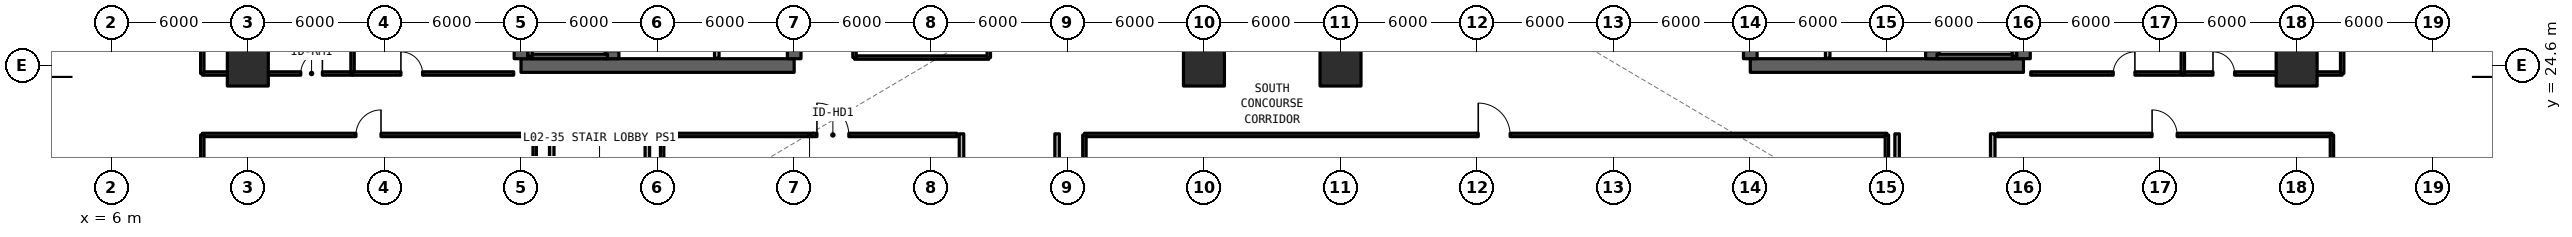
"""IFC4 building model, lengths in metres.
Left out: names, types, materials, properties, quantities, classifications, styles, units other than length and angle.
Written with IfcOpenShell. Run it as: python <this file> out.ifc"""

import sys

from ifc_helpers import new_model, si_unit, direction, frame, frame_2d, origin, origin_2d, place, context, subcontext, project, spatial, rectangle, extrude, element, fill, save


model = new_model("IFC4")
c1 = context("Model", 3, precision=1e-05, world=origin(), true_north=direction((0.0, 1.0)))
c2 = subcontext(c1, "Body", "Model", "MODEL_VIEW")
j1 = project(units=[si_unit("LENGTHUNIT", "METRE"), si_unit("PLANEANGLEUNIT", "RADIAN")], contexts=[c1])
p1 = place(None, origin())
s1 = spatial("IfcSite", under=j1, at=p1, CompositionType="ELEMENT")
p2 = place(p1, origin())
s2 = spatial("IfcBuilding", under=s1, at=p2, CompositionType="ELEMENT")
p3 = place(p2, frame((0.0, 0.0, 4.95)))
s3 = spatial("IfcBuildingStorey", under=s2, at=p3, CompositionType="ELEMENT", Elevation=4.95)
p4 = place(p3, frame((24.0, 24.6, 0.0), z_axis=(0.0, 0.0, 1.0), x_axis=(1.0, 0.0, 0.0)))
e1 = element("IfcWall", 1, at=p4, inside=s3, PredefinedType="SHEAR", context=c2, shape_type="SweptSolid", body=[
    extrude(rectangle(XDim=12.0, YDim=0.6, at=frame_2d((6.0, 0.0))), origin(), (0.0, 0.0, 1.0), 4.95),
])
p5 = place(p3, frame((24.0, 24.9, 0.0), z_axis=(0.0, 0.0, 1.0), x_axis=(0.0, 1.0, 0.0)))
e2 = element("IfcWall", 2, at=p5, inside=s3, PredefinedType="SHEAR", context=c2, shape_type="SweptSolid", body=[
    extrude(rectangle(XDim=17.4, YDim=0.6, at=frame_2d((8.7, 0.0))), origin(), (0.0, 0.0, 1.0), 4.95),
])
p6 = place(p3, frame((36.0, 24.9, 0.0), z_axis=(0.0, 0.0, 1.0), x_axis=(0.0, 1.0, 0.0)))
e3 = element("IfcWall", 3, at=p6, inside=s3, PredefinedType="SHEAR", context=c2, shape_type="SweptSolid", body=[
    extrude(rectangle(XDim=8.9, YDim=0.6, at=frame_2d((4.45, 0.0))), origin(), (0.0, 0.0, 1.0), 4.95),
])
p7 = place(p3, frame((28.0, 24.9, 0.0), z_axis=(0.0, 0.0, 1.0), x_axis=(0.0, 1.0, 0.0)))
e4 = element("IfcWall", 4, at=p7, inside=s3, PredefinedType="SHEAR", context=c2, shape_type="SweptSolid", body=[
    extrude(rectangle(XDim=17.4, YDim=0.6, at=frame_2d((8.7, 0.0))), origin(), (0.0, 0.0, 1.0), 4.95),
])
p8 = place(p7, frame((0.35, 0.0, 0.0)))
e5 = element("IfcOpeningElement", 5, at=p8, cuts=e4, PredefinedType="OPENING", context=c2, shape_type="SweptSolid", body=[
    extrude(rectangle(XDim=1.15, YDim=2.15, at=frame_2d((0.575, 1.075))), frame((0.0, 0.31, 0.0), z_axis=(0.0, -1.0, 0.0), x_axis=(1.0, 0.0, 0.0)), (0.0, 0.0, 1.0), 0.62),
])
p9 = place(p7, frame((9.55, 0.0, 0.0)))
e6 = element("IfcOpeningElement", 6, at=p9, cuts=e4, PredefinedType="OPENING", context=c2, shape_type="SweptSolid", body=[
    extrude(rectangle(XDim=1.15, YDim=2.15, at=frame_2d((0.575, 1.075))), frame((0.0, 0.31, 0.0), z_axis=(0.0, -1.0, 0.0), x_axis=(1.0, 0.0, 0.0)), (0.0, 0.0, 1.0), 0.62),
])
p10 = place(p3, frame((78.0, 24.6, 0.0), z_axis=(0.0, 0.0, 1.0), x_axis=(1.0, 0.0, 0.0)))
e7 = element("IfcWall", 7, at=p10, inside=s3, PredefinedType="SHEAR", context=c2, shape_type="SweptSolid", body=[
    extrude(rectangle(XDim=12.0, YDim=0.6, at=frame_2d((6.0, 0.0))), origin(), (0.0, 0.0, 1.0), 4.95),
])
p11 = place(p3, frame((90.0, 24.9, 0.0), z_axis=(0.0, 0.0, 1.0), x_axis=(0.0, 1.0, 0.0)))
e8 = element("IfcWall", 8, at=p11, inside=s3, PredefinedType="SHEAR", context=c2, shape_type="SweptSolid", body=[
    extrude(rectangle(XDim=17.4, YDim=0.6, at=frame_2d((8.7, 0.0))), origin(), (0.0, 0.0, 1.0), 4.95),
])
p12 = place(p3, frame((78.0, 24.9, 0.0), z_axis=(0.0, 0.0, 1.0), x_axis=(0.0, 1.0, 0.0)))
e9 = element("IfcWall", 9, at=p12, inside=s3, PredefinedType="SHEAR", context=c2, shape_type="SweptSolid", body=[
    extrude(rectangle(XDim=8.9, YDim=0.6, at=frame_2d((4.45, 0.0))), origin(), (0.0, 0.0, 1.0), 4.95),
])
p13 = place(p3, frame((86.0, 24.9, 0.0), z_axis=(0.0, 0.0, 1.0), x_axis=(0.0, 1.0, 0.0)))
e10 = element("IfcWall", 10, at=p13, inside=s3, PredefinedType="SHEAR", context=c2, shape_type="SweptSolid", body=[
    extrude(rectangle(XDim=17.4, YDim=0.6, at=frame_2d((8.7, 0.0))), origin(), (0.0, 0.0, 1.0), 4.95),
])
p14 = place(p13, frame((0.35, 0.0, 0.0)))
e11 = element("IfcOpeningElement", 11, at=p14, cuts=e10, PredefinedType="OPENING", context=c2, shape_type="SweptSolid", body=[
    extrude(rectangle(XDim=1.15, YDim=2.15, at=frame_2d((0.575, 1.075))), frame((0.0, 0.31, 0.0), z_axis=(0.0, -1.0, 0.0), x_axis=(1.0, 0.0, 0.0)), (0.0, 0.0, 1.0), 0.62),
])
p15 = place(p13, frame((9.55, 0.0, 0.0)))
e12 = element("IfcOpeningElement", 12, at=p15, cuts=e10, PredefinedType="OPENING", context=c2, shape_type="SweptSolid", body=[
    extrude(rectangle(XDim=1.15, YDim=2.15, at=frame_2d((0.575, 1.075))), frame((0.0, 0.31, 0.0), z_axis=(0.0, -1.0, 0.0), x_axis=(1.0, 0.0, 0.0)), (0.0, 0.0, 1.0), 0.62),
])
for number, where, z_axis, x_axis in (
    (13, (12.0, 24.6, 0.0), (0.0, 0.0, 1.0), (1.0, 0.0, 0.0)),
    (14, (54.0, 24.6, 0.0), (0.0, 0.0, 1.0), (1.0, 0.0, 0.0)),
    (15, (60.0, 24.6, 0.0), (0.0, 0.0, 1.0), (1.0, 0.0, 0.0)),
    (16, (102.0, 24.6, 0.0), (0.0, 0.0, 1.0), (1.0, 0.0, 0.0)),
):
    element("IfcColumn", number, at=place(p3, frame(where, z_axis=z_axis, x_axis=x_axis)), inside=s3, PredefinedType="COLUMN", context=c2, shape_type="SweptSolid", body=[
        extrude(rectangle(XDim=1.8, YDim=1.8, at=origin_2d()), origin(), (0.0, 0.0, 1.0), 4.95),
    ])
p16 = place(p3, frame((32.6, 24.92, 0.0), z_axis=(0.0, 0.0, 1.0), x_axis=(0.0, 1.0, 0.0)))
e17 = element("IfcWall", 17, at=p16, inside=s3, PredefinedType="SOLIDWALL", context=c2, shape_type="SweptSolid", body=[
    extrude(rectangle(XDim=3.58, YDim=0.2, at=frame_2d((1.79, 0.0))), origin(), (0.0, 0.0, 1.0), 3.89),
])
p17 = place(p16, frame((1.3, 0.0, 0.0)))
e18 = element("IfcOpeningElement", 18, at=p17, cuts=e17, PredefinedType="OPENING", context=c2, shape_type="SweptSolid", body=[
    extrude(rectangle(XDim=1.1, YDim=2.2, at=frame_2d((0.55, 1.1))), frame((0.0, 0.11, 0.0), z_axis=(0.0, -1.0, 0.0), x_axis=(1.0, 0.0, 0.0)), (0.0, 0.0, 1.0), 0.22),
])
p18 = place(p3, frame((81.4, 24.92, 0.0), z_axis=(0.0, 0.0, 1.0), x_axis=(0.0, 1.0, 0.0)))
e19 = element("IfcWall", 19, at=p18, inside=s3, PredefinedType="SOLIDWALL", context=c2, shape_type="SweptSolid", body=[
    extrude(rectangle(XDim=3.58, YDim=0.2, at=frame_2d((1.79, 0.0))), origin(), (0.0, 0.0, 1.0), 3.89),
])
p19 = place(p18, frame((1.3, 0.0, 0.0)))
e20 = element("IfcOpeningElement", 20, at=p19, cuts=e19, PredefinedType="OPENING", context=c2, shape_type="SweptSolid", body=[
    extrude(rectangle(XDim=1.1, YDim=2.2, at=frame_2d((0.55, 1.1))), frame((0.0, 0.11, 0.0), z_axis=(0.0, -1.0, 0.0), x_axis=(1.0, 0.0, 0.0)), (0.0, 0.0, 1.0), 0.22),
])
for number, where, z_axis, x_axis in (
    (21, (25.35, 17.0, 0.0), (0.0, 0.0, 1.0), (0.0, 1.0, 0.0)),
    (22, (29.55, 17.0, 0.0), (0.0, 0.0, 1.0), (0.0, 1.0, 0.0)),
    (23, (43.35, 17.0, 0.0), (0.0, 0.0, 1.0), (0.0, 1.0, 0.0)),
    (24, (47.55, 17.0, 0.0), (0.0, 0.0, 1.0), (0.0, 1.0, 0.0)),
    (25, (84.45, 17.0, 0.0), (0.0, 0.0, 1.0), (0.0, 1.0, 0.0)),
    (26, (88.65, 17.0, 0.0), (0.0, 0.0, 1.0), (0.0, 1.0, 0.0)),
):
    element("IfcWall", number, at=place(p3, frame(where, z_axis=z_axis, x_axis=x_axis)), inside=s3, PredefinedType="SOLIDWALL", context=c2, shape_type="SweptSolid", body=[
        extrude(rectangle(XDim=4.6, YDim=0.2, at=frame_2d((2.3, 0.0))), origin(), (0.0, 0.0, 1.0), 3.89),
    ])
p20 = place(p3, frame((30.2, 21.55, 0.0), z_axis=(0.0, 0.0, 1.0), x_axis=(1.0, 0.0, 0.0)))
e27 = element("IfcWall", 27, at=p20, inside=s3, PredefinedType="SOLIDWALL", context=c2, shape_type="SweptSolid", body=[
    extrude(rectangle(XDim=12.95, YDim=0.15, at=frame_2d((6.475, 0.0))), origin(), (0.0, 0.0, 1.0), 3.89),
])
p21 = place(p20, frame((6.8, 0.0, 0.0)))
e28 = element("IfcOpeningElement", 28, at=p21, cuts=e27, PredefinedType="OPENING", context=c2, shape_type="SweptSolid", body=[
    extrude(rectangle(XDim=1.4, YDim=2.15, at=frame_2d((0.7, 1.075))), frame((0.0, 0.085, 0.0), z_axis=(0.0, -1.0, 0.0), x_axis=(1.0, 0.0, 0.0)), (0.0, 0.0, 1.0), 0.17),
])
p22 = place(p3, frame((30.2, 1.3, 0.0), z_axis=(0.0, 0.0, 1.0), x_axis=(0.0, 1.0, 0.0)))
e29 = element("IfcWall", 29, at=p22, inside=s3, PredefinedType="SOLIDWALL", context=c2, shape_type="SweptSolid", body=[
    extrude(rectangle(XDim=20.25, YDim=0.15, at=frame_2d((10.125, 0.0))), origin(), (0.0, 0.0, 1.0), 3.89),
])
p23 = place(p3, frame((48.75, 21.55, 0.0), z_axis=(0.0, 0.0, 1.0), x_axis=(1.0, 0.0, 0.0)))
e30 = element("IfcWall", 30, at=p23, inside=s3, PredefinedType="SOLIDWALL", context=c2, shape_type="SweptSolid", body=[
    extrude(rectangle(XDim=35.25, YDim=0.15, at=frame_2d((17.625, 0.0))), origin(), (0.0, 0.0, 1.0), 3.89),
])
p24 = place(p23, frame((17.3, 0.0, 0.0)))
e31 = element("IfcOpeningElement", 31, at=p24, cuts=e30, PredefinedType="OPENING", context=c2, shape_type="SweptSolid", body=[
    extrude(rectangle(XDim=1.4, YDim=2.15, at=frame_2d((0.7, 1.075))), frame((0.0, 0.085, 0.0), z_axis=(0.0, -1.0, 0.0), x_axis=(1.0, 0.0, 0.0)), (0.0, 0.0, 1.0), 0.17),
])
for number, where, z_axis, x_axis in (
    (32, (48.75, 1.3, 0.0), (0.0, 0.0, 1.0), (0.0, 1.0, 0.0)),
    (33, (84.0, 1.3, 0.0), (0.0, 0.0, 1.0), (0.0, 1.0, 0.0)),
):
    element("IfcWall", number, at=place(p3, frame(where, z_axis=z_axis, x_axis=x_axis)), inside=s3, PredefinedType="SOLIDWALL", context=c2, shape_type="SweptSolid", body=[
        extrude(rectangle(XDim=20.25, YDim=0.15, at=frame_2d((10.125, 0.0))), origin(), (0.0, 0.0, 1.0), 3.89),
    ])
p25 = place(p3, frame((10.0, 24.25, 0.0), z_axis=(0.0, 0.0, 1.0), x_axis=(1.0, 0.0, 0.0)))
e34 = element("IfcWall", 34, at=p25, inside=s3, PredefinedType="SOLIDWALL", context=c2, shape_type="SweptSolid", body=[
    extrude(rectangle(XDim=6.6, YDim=0.15, at=frame_2d((3.3, 0.0))), origin(), (0.0, 0.0, 1.0), 3.89),
])
p26 = place(p25, frame((4.325, 0.0, 0.0)))
e35 = element("IfcOpeningElement", 35, at=p26, cuts=e34, PredefinedType="OPENING", context=c2, shape_type="SweptSolid", body=[
    extrude(rectangle(XDim=0.95, YDim=2.15, at=frame_2d((0.475, 1.075))), frame((0.0, 0.085, 0.0), z_axis=(0.0, -1.0, 0.0), x_axis=(1.0, 0.0, 0.0)), (0.0, 0.0, 1.0), 0.17),
])
for number, where, z_axis, x_axis in (
    (36, (10.0, 24.25, 0.0), (0.0, 0.0, 1.0), (0.0, 1.0, 0.0)),
    (37, (16.6, 24.25, 0.0), (0.0, 0.0, 1.0), (0.0, 1.0, 0.0)),
):
    element("IfcWall", number, at=place(p3, frame(where, z_axis=z_axis, x_axis=x_axis)), inside=s3, PredefinedType="SOLIDWALL", context=c2, shape_type="SweptSolid", body=[
        extrude(rectangle(XDim=8.55, YDim=0.15, at=frame_2d((4.275, 0.0))), origin(), (0.0, 0.0, 1.0), 3.89),
    ])
p27 = place(p3, frame((16.6, 24.25, 0.0), z_axis=(0.0, 0.0, 1.0), x_axis=(1.0, 0.0, 0.0)))
e38 = element("IfcWall", 38, at=p27, inside=s3, PredefinedType="SOLIDWALL", context=c2, shape_type="SweptSolid", body=[
    extrude(rectangle(XDim=7.08, YDim=0.15, at=frame_2d((3.54, 0.0))), origin(), (0.0, 0.0, 1.0), 3.89),
])
p28 = place(p27, frame((2.125, 0.0, 0.0)))
e39 = element("IfcOpeningElement", 39, at=p28, cuts=e38, PredefinedType="OPENING", context=c2, shape_type="SweptSolid", body=[
    extrude(rectangle(XDim=0.95, YDim=2.15, at=frame_2d((0.475, 1.075))), frame((0.0, 0.085, 0.0), z_axis=(0.0, -1.0, 0.0), x_axis=(1.0, 0.0, 0.0)), (0.0, 0.0, 1.0), 0.17),
])
p29 = place(p3, frame((90.32, 24.25, 0.0), z_axis=(0.0, 0.0, 1.0), x_axis=(1.0, 0.0, 0.0)))
e40 = element("IfcWall", 40, at=p29, inside=s3, PredefinedType="SOLIDWALL", context=c2, shape_type="SweptSolid", body=[
    extrude(rectangle(XDim=6.68, YDim=0.15, at=frame_2d((3.34, 0.0))), origin(), (0.0, 0.0, 1.0), 3.89),
])
p30 = place(p29, frame((3.625, 0.0, 0.0)))
e41 = element("IfcOpeningElement", 41, at=p30, cuts=e40, PredefinedType="OPENING", context=c2, shape_type="SweptSolid", body=[
    extrude(rectangle(XDim=0.95, YDim=2.15, at=frame_2d((0.475, 1.075))), frame((0.0, 0.085, 0.0), z_axis=(0.0, -1.0, 0.0), x_axis=(1.0, 0.0, 0.0)), (0.0, 0.0, 1.0), 0.17),
])
p31 = place(p3, frame((97.0, 24.25, 0.0), z_axis=(0.0, 0.0, 1.0), x_axis=(1.0, 0.0, 0.0)))
e42 = element("IfcWall", 42, at=p31, inside=s3, PredefinedType="SOLIDWALL", context=c2, shape_type="SweptSolid", body=[
    extrude(rectangle(XDim=7.0, YDim=0.15, at=frame_2d((3.5, 0.0))), origin(), (0.0, 0.0, 1.0), 3.89),
])
p32 = place(p31, frame((1.325, 0.0, 0.0)))
e43 = element("IfcOpeningElement", 43, at=p32, cuts=e42, PredefinedType="OPENING", context=c2, shape_type="SweptSolid", body=[
    extrude(rectangle(XDim=0.95, YDim=2.15, at=frame_2d((0.475, 1.075))), frame((0.0, 0.085, 0.0), z_axis=(0.0, -1.0, 0.0), x_axis=(1.0, 0.0, 0.0)), (0.0, 0.0, 1.0), 0.17),
])
for number, where, z_axis, x_axis in (
    (44, (97.0, 24.25, 0.0), (0.0, 0.0, 1.0), (0.0, 1.0, 0.0)),
    (45, (104.0, 24.25, 0.0), (0.0, 0.0, 1.0), (0.0, 1.0, 0.0)),
):
    element("IfcWall", number, at=place(p3, frame(where, z_axis=z_axis, x_axis=x_axis)), inside=s3, PredefinedType="SOLIDWALL", context=c2, shape_type="SweptSolid", body=[
        extrude(rectangle(XDim=8.55, YDim=0.15, at=frame_2d((4.275, 0.0))), origin(), (0.0, 0.0, 1.0), 3.89),
    ])
p33 = place(p3, frame((38.65, 24.95, 0.0), z_axis=(0.0, 0.0, 1.0), x_axis=(1.0, 0.0, 0.0)))
e46 = element("IfcWall", 46, at=p33, inside=s3, PredefinedType="SOLIDWALL", context=c2, shape_type="SweptSolid", body=[
    extrude(rectangle(XDim=5.9, YDim=0.15, at=frame_2d((2.95, 0.0))), origin(), (0.0, 0.0, 1.0), 3.89),
])
p34 = place(p3, frame((38.65, 24.95, 0.0), z_axis=(0.0, 0.0, 1.0), x_axis=(0.0, 1.0, 0.0)))
e47 = element("IfcWall", 47, at=p34, inside=s3, PredefinedType="SOLIDWALL", context=c2, shape_type="SweptSolid", body=[
    extrude(rectangle(XDim=17.3, YDim=0.15, at=frame_2d((8.65, 0.0))), origin(), (0.0, 0.0, 1.0), 3.89),
])
p35 = place(p34, frame((7.525, 0.0, 0.0)))
e48 = element("IfcOpeningElement", 48, at=p35, cuts=e47, PredefinedType="OPENING", context=c2, shape_type="SweptSolid", body=[
    extrude(rectangle(XDim=0.95, YDim=2.15, at=frame_2d((0.475, 1.075))), frame((0.0, 0.085, 0.0), z_axis=(0.0, -1.0, 0.0), x_axis=(1.0, 0.0, 0.0)), (0.0, 0.0, 1.0), 0.17),
])
p36 = place(p3, frame((44.55, 24.95, 0.0), z_axis=(0.0, 0.0, 1.0), x_axis=(0.0, 1.0, 0.0)))
e49 = element("IfcWall", 49, at=p36, inside=s3, PredefinedType="SOLIDWALL", context=c2, shape_type="SweptSolid", body=[
    extrude(rectangle(XDim=17.3, YDim=0.15, at=frame_2d((8.65, 0.0))), origin(), (0.0, 0.0, 1.0), 3.89),
])
p37 = place(p3, frame((10.0, 21.55, 0.0), z_axis=(0.0, 0.0, 1.0), x_axis=(1.0, 0.0, 0.0)))
e50 = element("IfcWall", 50, at=p37, inside=s3, PredefinedType="SOLIDWALL", context=c2, shape_type="SweptSolid", body=[
    extrude(rectangle(XDim=14.6, YDim=0.15, at=frame_2d((7.3, 0.0))), origin(), (0.0, 0.0, 1.0), 3.89),
])
p38 = place(p37, frame((6.75, 0.0, 0.0)))
e51 = element("IfcOpeningElement", 51, at=p38, cuts=e50, PredefinedType="OPENING", context=c2, shape_type="SweptSolid", body=[
    extrude(rectangle(XDim=1.1, YDim=2.15, at=frame_2d((0.55, 1.075))), frame((0.0, 0.085, 0.0), z_axis=(0.0, -1.0, 0.0), x_axis=(1.0, 0.0, 0.0)), (0.0, 0.0, 1.0), 0.17),
])
for number, where, z_axis, x_axis in (
    (52, (10.0, 1.3, 0.0), (0.0, 0.0, 1.0), (0.0, 1.0, 0.0)),
    (53, (24.6, 1.3, 0.0), (0.0, 0.0, 1.0), (0.0, 1.0, 0.0)),
):
    element("IfcWall", number, at=place(p3, frame(where, z_axis=z_axis, x_axis=x_axis)), inside=s3, PredefinedType="SOLIDWALL", context=c2, shape_type="SweptSolid", body=[
        extrude(rectangle(XDim=20.25, YDim=0.15, at=frame_2d((10.125, 0.0))), origin(), (0.0, 0.0, 1.0), 3.89),
    ])
p39 = place(p3, frame((88.85, 21.55, 0.0), z_axis=(0.0, 0.0, 1.0), x_axis=(1.0, 0.0, 0.0)))
e54 = element("IfcWall", 54, at=p39, inside=s3, PredefinedType="SOLIDWALL", context=c2, shape_type="SweptSolid", body=[
    extrude(rectangle(XDim=14.7, YDim=0.15, at=frame_2d((7.35, 0.0))), origin(), (0.0, 0.0, 1.0), 3.89),
])
p40 = place(p39, frame((6.8, 0.0, 0.0)))
e55 = element("IfcOpeningElement", 55, at=p40, cuts=e54, PredefinedType="OPENING", context=c2, shape_type="SweptSolid", body=[
    extrude(rectangle(XDim=1.1, YDim=2.15, at=frame_2d((0.55, 1.075))), frame((0.0, 0.085, 0.0), z_axis=(0.0, -1.0, 0.0), x_axis=(1.0, 0.0, 0.0)), (0.0, 0.0, 1.0), 0.17),
])
p41 = place(p3, frame((103.55, 1.3, 0.0), z_axis=(0.0, 0.0, 1.0), x_axis=(0.0, 1.0, 0.0)))
e56 = element("IfcWall", 56, at=p41, inside=s3, PredefinedType="SOLIDWALL", context=c2, shape_type="SweptSolid", body=[
    extrude(rectangle(XDim=20.25, YDim=0.15, at=frame_2d((10.125, 0.0))), origin(), (0.0, 0.0, 1.0), 3.89),
])
p42 = place(p3, frame((24.4, 25.0, 0.0), z_axis=(0.0, 0.0, 1.0), x_axis=(1.0, 0.0, 0.0)))
e57 = element("IfcWall", 57, at=p42, inside=s3, PredefinedType="SOLIDWALL", context=c2, shape_type="SweptSolid", body=[
    extrude(rectangle(XDim=3.4, YDim=0.2, at=frame_2d((1.7, 0.0))), origin(), (0.0, 0.0, 1.0), 4.95),
])
p43 = place(p3, frame((24.4, 33.0, 0.0), z_axis=(0.0, 0.0, 1.0), x_axis=(0.0, -1.0, 0.0)))
e58 = element("IfcWall", 58, at=p43, inside=s3, PredefinedType="SOLIDWALL", context=c2, shape_type="SweptSolid", body=[
    extrude(rectangle(XDim=8.0, YDim=0.2, at=frame_2d((4.0, 0.0))), origin(), (0.0, 0.0, 1.0), 4.95),
])
p44 = place(p3, frame((86.2, 25.0, 0.0), z_axis=(0.0, 0.0, 1.0), x_axis=(1.0, 0.0, 0.0)))
e59 = element("IfcWall", 59, at=p44, inside=s3, PredefinedType="SOLIDWALL", context=c2, shape_type="SweptSolid", body=[
    extrude(rectangle(XDim=3.4, YDim=0.2, at=frame_2d((1.7, 0.0))), origin(), (0.0, 0.0, 1.0), 4.95),
])
p45 = place(p3, frame((89.6, 25.0, 0.0), z_axis=(0.0, 0.0, 1.0), x_axis=(0.0, 1.0, 0.0)))
e60 = element("IfcWall", 60, at=p45, inside=s3, PredefinedType="SOLIDWALL", context=c2, shape_type="SweptSolid", body=[
    extrude(rectangle(XDim=8.0, YDim=0.2, at=frame_2d((4.0, 0.0))), origin(), (0.0, 0.0, 1.0), 4.95),
])
p46 = place(p21, origin())
e61 = element("IfcDoor", 61, at=p46, inside=s3, OperationType="SINGLE_SWING_LEFT", PredefinedType="DOOR", context=c2, shape_type="SweptSolid", body=[
    extrude(rectangle(XDim=1.4, YDim=2.15, at=frame_2d((0.7, 1.075))), frame((0.0, 0.025, 0.0), z_axis=(0.0, -1.0, 0.0), x_axis=(1.0, 0.0, 0.0)), (0.0, 0.0, 1.0), 0.05),
])
fill(e28, e61)
p47 = place(p24, origin())
e62 = element("IfcDoor", 62, at=p47, inside=s3, OperationType="SINGLE_SWING_RIGHT", PredefinedType="DOOR", context=c2, shape_type="SweptSolid", body=[
    extrude(rectangle(XDim=1.4, YDim=2.15, at=frame_2d((0.7, 1.075))), frame((0.0, 0.025, 0.0), z_axis=(0.0, -1.0, 0.0), x_axis=(1.0, 0.0, 0.0)), (0.0, 0.0, 1.0), 0.05),
])
fill(e31, e62)
p48 = place(p26, origin())
e63 = element("IfcDoor", 63, at=p48, inside=s3, OperationType="SINGLE_SWING_RIGHT", PredefinedType="DOOR", context=c2, shape_type="SweptSolid", body=[
    extrude(rectangle(XDim=0.95, YDim=2.15, at=frame_2d((0.475, 1.075))), frame((0.0, 0.025, 0.0), z_axis=(0.0, -1.0, 0.0), x_axis=(1.0, 0.0, 0.0)), (0.0, 0.0, 1.0), 0.05),
])
fill(e35, e63)
p49 = place(p28, origin())
e64 = element("IfcDoor", 64, at=p49, inside=s3, OperationType="SINGLE_SWING_LEFT", PredefinedType="DOOR", context=c2, shape_type="SweptSolid", body=[
    extrude(rectangle(XDim=0.95, YDim=2.15, at=frame_2d((0.475, 1.075))), frame((0.0, 0.025, 0.0), z_axis=(0.0, -1.0, 0.0), x_axis=(1.0, 0.0, 0.0)), (0.0, 0.0, 1.0), 0.05),
])
fill(e39, e64)
p50 = place(p30, origin())
e65 = element("IfcDoor", 65, at=p50, inside=s3, OperationType="SINGLE_SWING_RIGHT", PredefinedType="DOOR", context=c2, shape_type="SweptSolid", body=[
    extrude(rectangle(XDim=0.95, YDim=2.15, at=frame_2d((0.475, 1.075))), frame((0.0, 0.025, 0.0), z_axis=(0.0, -1.0, 0.0), x_axis=(1.0, 0.0, 0.0)), (0.0, 0.0, 1.0), 0.05),
])
fill(e41, e65)
p51 = place(p32, origin())
e66 = element("IfcDoor", 66, at=p51, inside=s3, OperationType="SINGLE_SWING_LEFT", PredefinedType="DOOR", context=c2, shape_type="SweptSolid", body=[
    extrude(rectangle(XDim=0.95, YDim=2.15, at=frame_2d((0.475, 1.075))), frame((0.0, 0.025, 0.0), z_axis=(0.0, -1.0, 0.0), x_axis=(1.0, 0.0, 0.0)), (0.0, 0.0, 1.0), 0.05),
])
fill(e43, e66)
p52 = place(p38, origin())
e67 = element("IfcDoor", 67, at=p52, inside=s3, OperationType="SINGLE_SWING_RIGHT", PredefinedType="DOOR", context=c2, shape_type="SweptSolid", body=[
    extrude(rectangle(XDim=1.1, YDim=2.15, at=frame_2d((0.55, 1.075))), frame((0.0, 0.025, 0.0), z_axis=(0.0, -1.0, 0.0), x_axis=(1.0, 0.0, 0.0)), (0.0, 0.0, 1.0), 0.05),
])
fill(e51, e67)
p53 = place(p40, origin())
e68 = element("IfcDoor", 68, at=p53, inside=s3, OperationType="SINGLE_SWING_LEFT", PredefinedType="DOOR", context=c2, shape_type="SweptSolid", body=[
    extrude(rectangle(XDim=1.1, YDim=2.15, at=frame_2d((0.55, 1.075))), frame((0.0, 0.025, 0.0), z_axis=(0.0, -1.0, 0.0), x_axis=(1.0, 0.0, 0.0)), (0.0, 0.0, 1.0), 0.05),
])
fill(e55, e68)
save(model, sys.argv[1])
